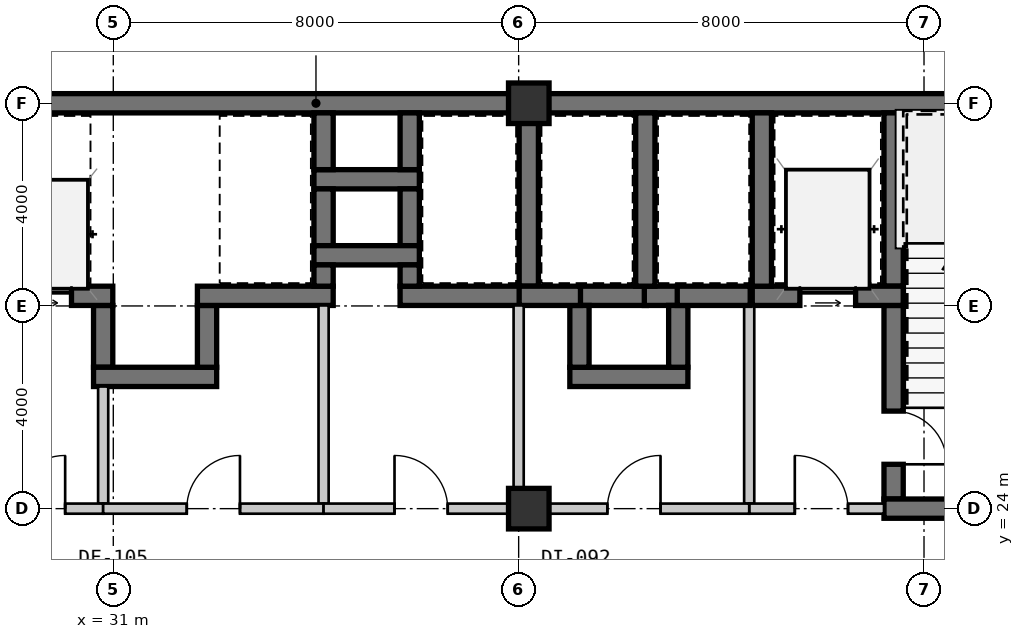
"""IFC4 building model, lengths in metres.
Left out: names, types, materials, properties, quantities, classifications, styles, units other than length and angle.
Written with IfcOpenShell. Run it as: python <this file> out.ifc"""

import sys

from ifc_helpers import new_model, si_unit, direction, frame, frame_2d, origin, origin_2d, place, context, subcontext, project, spatial, rectangle, extrude, source, transform, mapped, element, fill, save


model = new_model("IFC4")
c1 = context("Model", 3, precision=1e-05, world=origin(), true_north=direction((0.0, 1.0)))
c2 = subcontext(c1, "Body", "Model", "MODEL_VIEW")
j1 = project(units=[si_unit("LENGTHUNIT", "METRE"), si_unit("PLANEANGLEUNIT", "RADIAN")], contexts=[c1])
p1 = place(None, origin())
s1 = spatial("IfcSite", under=j1, at=p1, CompositionType="ELEMENT")
p2 = place(p1, origin())
s2 = spatial("IfcBuilding", under=s1, at=p2, CompositionType="ELEMENT")
p3 = place(p2, frame((0.0, 0.0, 57.75)))
s3 = spatial("IfcBuildingStorey", under=s2, at=p3, CompositionType="ELEMENT", Elevation=57.75)
m1 = source(origin(), c2, "Body", "SweptSolid", [
    extrude(rectangle(XDim=0.8, YDim=0.8, at=origin_2d()), origin(), (0.0, 0.0, 1.0), 3.15),
])
for number, where, z_axis, x_axis in (
    (1, (39.2, 24.0, 0.0), (0.0, 0.0, 1.0), (1.0, 0.0, 0.0)),
    (2, (39.2, 32.0, 0.0), (0.0, 0.0, 1.0), (1.0, 0.0, 0.0)),
):
    element("IfcColumn", number, at=place(p3, frame(where, z_axis=z_axis, x_axis=x_axis)), inside=s3, PredefinedType="COLUMN", context=c2, shape_type="MappedRepresentation", body=[
        mapped(m1, transform((0.0, 0.0, 0.0), scale=1.0)),
    ])
m2 = source(origin(), c2, "Body", "SweptSolid", [
    extrude(rectangle(XDim=11.2, YDim=0.38, at=frame_2d((5.6, 0.0))), origin(), (0.0, 0.0, 1.0), 2.87),
])
p4 = place(p3, frame((28.0, 32.0, 0.0), z_axis=(0.0, 0.0, 1.0), x_axis=(1.0, 0.0, 0.0)))
e3 = element("IfcWall", 3, at=p4, inside=s3, PredefinedType="SHEAR", context=c2, shape_type="MappedRepresentation", body=[
    mapped(m2, transform((0.0, 0.0, 0.0), scale=1.0)),
])
m3 = source(origin(), c2, "Body", "SweptSolid", [
    extrude(rectangle(XDim=11.99, YDim=0.38, at=frame_2d((5.995, 0.0))), origin(), (0.0, 0.0, 1.0), 2.87),
])
p5 = place(p3, frame((39.2, 32.0, 0.0), z_axis=(0.0, 0.0, 1.0), x_axis=(1.0, 0.0, 0.0)))
e4 = element("IfcWall", 4, at=p5, inside=s3, PredefinedType="SHEAR", context=c2, shape_type="MappedRepresentation", body=[
    mapped(m3, transform((0.0, 0.0, 0.0), scale=1.0)),
])
m4 = source(origin(), c2, "Body", "SweptSolid", [
    extrude(rectangle(XDim=3.42, YDim=0.38, at=frame_2d((1.71, 0.0))), origin(), (0.0, 0.0, 1.0), 2.87),
])
p6 = place(p3, frame((46.4, 31.81, 0.0), z_axis=(0.0, 0.0, 1.0), x_axis=(0.0, -1.0, 0.0)))
e5 = element("IfcWall", 5, at=p6, inside=s3, PredefinedType="SHEAR", context=c2, shape_type="MappedRepresentation", body=[
    mapped(m4, transform((0.0, 0.0, 0.0), scale=1.0)),
])
m5 = source(origin(), c2, "Body", "SweptSolid", [
    extrude(rectangle(XDim=3.82, YDim=0.38, at=frame_2d((1.91, 0.0))), origin(), (0.0, 0.0, 1.0), 2.87),
])
p7 = place(p3, frame((46.4, 28.01, 0.0), z_axis=(0.0, 0.0, 1.0), x_axis=(0.0, -1.0, 0.0)))
e6 = element("IfcWall", 6, at=p7, inside=s3, PredefinedType="SHEAR", context=c2, shape_type="MappedRepresentation", body=[
    mapped(m5, transform((0.0, 0.0, 0.0), scale=1.0)),
])
m6 = source(origin(), c2, "Body", "SweptSolid", [
    extrude(rectangle(XDim=1.05, YDim=2.1, at=frame_2d((0.525, 1.05))), frame((0.0, 0.2, 0.0), z_axis=(0.0, -1.0, 0.0), x_axis=(1.0, 0.0, 0.0)), (0.0, 0.0, 1.0), 0.4),
])
p8 = place(p7, frame((2.085, 0.0, 0.0)))
e7 = element("IfcOpeningElement", 7, at=p8, cuts=e6, PredefinedType="OPENING", context=c2, shape_type="MappedRepresentation", body=[
    mapped(m6, transform((0.0, 0.0, 0.0), scale=1.0)),
])
m7 = source(origin(), c2, "Body", "SweptSolid", [
    extrude(rectangle(XDim=4.98, YDim=0.38, at=frame_2d((2.49, 0.0))), origin(), (0.0, 0.0, 1.0), 2.87),
])
p9 = place(p3, frame((46.21, 24.0, 0.0), z_axis=(0.0, 0.0, 1.0), x_axis=(1.0, 0.0, 0.0)))
e8 = element("IfcWall", 8, at=p9, inside=s3, PredefinedType="SHEAR", context=c2, shape_type="MappedRepresentation", body=[
    mapped(m7, transform((0.0, 0.0, 0.0), scale=1.0)),
])
m8 = source(origin(), c2, "Body", "SweptSolid", [
    extrude(rectangle(XDim=2.98, YDim=0.38, at=frame_2d((1.49, 0.0))), origin(), (0.0, 0.0, 1.0), 2.87),
])
p10 = place(p3, frame((43.61, 28.2, 0.0), z_axis=(0.0, 0.0, 1.0), x_axis=(1.0, 0.0, 0.0)))
e9 = element("IfcWall", 9, at=p10, inside=s3, PredefinedType="SHEAR", context=c2, shape_type="MappedRepresentation", body=[
    mapped(m8, transform((0.0, 0.0, 0.0), scale=1.0)),
])
m9 = source(origin(), c2, "Body", "SweptSolid", [
    extrude(rectangle(XDim=1.1, YDim=2.15, at=frame_2d((0.55, 1.075))), frame((0.0, 0.2, 0.0), z_axis=(0.0, -1.0, 0.0), x_axis=(1.0, 0.0, 0.0)), (0.0, 0.0, 1.0), 0.4),
])
p11 = place(p10, frame((0.94, 0.0, 0.0)))
e10 = element("IfcOpeningElement", 10, at=p11, cuts=e9, PredefinedType="OPENING", context=c2, shape_type="MappedRepresentation", body=[
    mapped(m9, transform((0.0, 0.0, 0.0), scale=1.0)),
])
p12 = place(p3, frame((43.8, 31.81, 0.0), z_axis=(0.0, 0.0, 1.0), x_axis=(0.0, -1.0, 0.0)))
e11 = element("IfcWall", 11, at=p12, inside=s3, PredefinedType="SHEAR", context=c2, shape_type="MappedRepresentation", body=[
    mapped(m4, transform((0.0, 0.0, 0.0), scale=1.0)),
])
m10 = source(origin(), c2, "Body", "SweptSolid", [
    extrude(rectangle(XDim=3.91, YDim=0.2, at=frame_2d((1.955, 0.0))), origin(), (0.0, 0.0, 1.0), 2.87),
])
p13 = place(p3, frame((43.55, 28.01, 0.0), z_axis=(0.0, 0.0, 1.0), x_axis=(0.0, -1.0, 0.0)))
e12 = element("IfcWall", 12, at=p13, inside=s3, PredefinedType="SOLIDWALL", context=c2, shape_type="MappedRepresentation", body=[
    mapped(m10, transform((0.0, 0.0, 0.0), scale=1.0)),
])
m11 = source(origin(), c2, "Body", "SweptSolid", [
    extrude(rectangle(XDim=2.66, YDim=0.2, at=frame_2d((1.33, 0.0))), origin(), (0.0, 0.0, 1.0), 2.337),
])
p14 = place(p3, frame((43.55, 24.0, 0.0), z_axis=(0.0, 0.0, 1.0), x_axis=(1.0, 0.0, 0.0)))
e13 = element("IfcWall", 13, at=p14, inside=s3, PredefinedType="SOLIDWALL", context=c2, shape_type="MappedRepresentation", body=[
    mapped(m11, transform((0.0, 0.0, 0.0), scale=1.0)),
])
m12 = source(origin(), c2, "Body", "SweptSolid", [
    extrude(rectangle(XDim=1.05, YDim=2.1, at=frame_2d((0.525, 1.05))), frame((0.0, 0.11, 0.0), z_axis=(0.0, -1.0, 0.0), x_axis=(1.0, 0.0, 0.0)), (0.0, 0.0, 1.0), 0.22),
])
p15 = place(p14, frame((0.9, 0.0, 0.0)))
e14 = element("IfcOpeningElement", 14, at=p15, cuts=e13, PredefinedType="OPENING", context=c2, shape_type="MappedRepresentation", body=[
    mapped(m12, transform((0.0, 0.0, 0.0), scale=1.0)),
])
m13 = source(origin(), c2, "Body", "SweptSolid", [
    extrude(rectangle(XDim=2.08, YDim=0.38, at=frame_2d((1.04, 0.0))), origin(), (0.0, 0.0, 1.0), 2.87),
])
p16 = place(p3, frame((34.96, 30.5, 0.0), z_axis=(0.0, 0.0, 1.0), x_axis=(1.0, 0.0, 0.0)))
e15 = element("IfcWall", 15, at=p16, inside=s3, PredefinedType="SHEAR", context=c2, shape_type="MappedRepresentation", body=[
    mapped(m13, transform((0.0, 0.0, 0.0), scale=1.0)),
])
m14 = source(origin(), c2, "Body", "SweptSolid", [
    extrude(rectangle(XDim=1.12, YDim=0.38, at=frame_2d((0.56, 0.0))), origin(), (0.0, 0.0, 1.0), 2.87),
])
for number, where, z_axis, x_axis in (
    (16, (35.15, 31.81, 0.0), (0.0, 0.0, 1.0), (0.0, -1.0, 0.0)),
    (17, (36.85, 30.69, 0.0), (0.0, 0.0, 1.0), (0.0, 1.0, 0.0)),
    (18, (35.15, 30.31, 0.0), (0.0, 0.0, 1.0), (0.0, -1.0, 0.0)),
    (19, (36.85, 29.19, 0.0), (0.0, 0.0, 1.0), (0.0, 1.0, 0.0)),
):
    element("IfcWall", number, at=place(p3, frame(where, z_axis=z_axis, x_axis=x_axis)), inside=s3, PredefinedType="SHEAR", context=c2, shape_type="MappedRepresentation", body=[
        mapped(m14, transform((0.0, 0.0, 0.0), scale=1.0)),
    ])
p17 = place(p3, frame((34.96, 29.0, 0.0), z_axis=(0.0, 0.0, 1.0), x_axis=(1.0, 0.0, 0.0)))
e20 = element("IfcWall", 20, at=p17, inside=s3, PredefinedType="SHEAR", context=c2, shape_type="MappedRepresentation", body=[
    mapped(m13, transform((0.0, 0.0, 0.0), scale=1.0)),
])
m15 = source(origin(), c2, "Body", "SweptSolid", [
    extrude(rectangle(XDim=1.22, YDim=0.38, at=frame_2d((0.61, 0.0))), origin(), (0.0, 0.0, 1.0), 2.87),
])
p18 = place(p3, frame((30.8, 28.01, 0.0), z_axis=(0.0, 0.0, 1.0), x_axis=(0.0, -1.0, 0.0)))
e21 = element("IfcWall", 21, at=p18, inside=s3, PredefinedType="SHEAR", context=c2, shape_type="MappedRepresentation", body=[
    mapped(m15, transform((0.0, 0.0, 0.0), scale=1.0)),
])
m16 = source(origin(), c2, "Body", "SweptSolid", [
    extrude(rectangle(XDim=2.43, YDim=0.38, at=frame_2d((1.215, 0.0))), origin(), (0.0, 0.0, 1.0), 2.87),
])
p19 = place(p3, frame((30.61, 26.6, 0.0), z_axis=(0.0, 0.0, 1.0), x_axis=(1.0, 0.0, 0.0)))
e22 = element("IfcWall", 22, at=p19, inside=s3, PredefinedType="SHEAR", context=c2, shape_type="MappedRepresentation", body=[
    mapped(m16, transform((0.0, 0.0, 0.0), scale=1.0)),
])
p20 = place(p3, frame((32.85, 26.79, 0.0), z_axis=(0.0, 0.0, 1.0), x_axis=(0.0, 1.0, 0.0)))
e23 = element("IfcWall", 23, at=p20, inside=s3, PredefinedType="SHEAR", context=c2, shape_type="MappedRepresentation", body=[
    mapped(m15, transform((0.0, 0.0, 0.0), scale=1.0)),
])
m17 = source(origin(), c2, "Body", "SweptSolid", [
    extrude(rectangle(XDim=1.32, YDim=0.38, at=frame_2d((0.66, 0.0))), origin(), (0.0, 0.0, 1.0), 2.87),
])
p21 = place(p3, frame((41.52, 28.2, 0.0), z_axis=(0.0, 0.0, 1.0), x_axis=(-1.0, 0.0, 0.0)))
e24 = element("IfcWall", 24, at=p21, inside=s3, PredefinedType="SHEAR", context=c2, shape_type="MappedRepresentation", body=[
    mapped(m17, transform((0.0, 0.0, 0.0), scale=1.0)),
])
m18 = source(origin(), c2, "Body", "SweptSolid", [
    extrude(rectangle(XDim=0.67, YDim=0.38, at=frame_2d((0.335, 0.0))), origin(), (0.0, 0.0, 1.0), 2.87),
])
p22 = place(p3, frame((42.15, 28.2, 0.0), z_axis=(0.0, 0.0, 1.0), x_axis=(-1.0, 0.0, 0.0)))
e25 = element("IfcWall", 25, at=p22, inside=s3, PredefinedType="SHEAR", context=c2, shape_type="MappedRepresentation", body=[
    mapped(m18, transform((0.0, 0.0, 0.0), scale=1.0)),
])
m19 = source(origin(), c2, "Body", "SweptSolid", [
    extrude(rectangle(XDim=2.33, YDim=0.38, at=frame_2d((1.165, 0.0))), origin(), (0.0, 0.0, 1.0), 2.87),
])
p23 = place(p3, frame((40.01, 26.6, 0.0), z_axis=(0.0, 0.0, 1.0), x_axis=(1.0, 0.0, 0.0)))
e26 = element("IfcWall", 26, at=p23, inside=s3, PredefinedType="SHEAR", context=c2, shape_type="MappedRepresentation", body=[
    mapped(m19, transform((0.0, 0.0, 0.0), scale=1.0)),
])
for number, where, z_axis, x_axis in (
    (27, (40.2, 28.01, 0.0), (0.0, 0.0, 1.0), (0.0, -1.0, 0.0)),
    (28, (42.15, 26.79, 0.0), (0.0, 0.0, 1.0), (0.0, 1.0, 0.0)),
):
    element("IfcWall", number, at=place(p3, frame(where, z_axis=z_axis, x_axis=x_axis)), inside=s3, PredefinedType="SHEAR", context=c2, shape_type="MappedRepresentation", body=[
        mapped(m15, transform((0.0, 0.0, 0.0), scale=1.0)),
    ])
m20 = source(origin(), c2, "Body", "SweptSolid", [
    extrude(rectangle(XDim=2.49, YDim=0.38, at=frame_2d((1.245, 0.0))), origin(), (0.0, 0.0, 1.0), 2.87),
])
p24 = place(p3, frame((28.5, 28.2, 0.0), z_axis=(0.0, 0.0, 1.0), x_axis=(1.0, 0.0, 0.0)))
e29 = element("IfcWall", 29, at=p24, inside=s3, PredefinedType="SHEAR", context=c2, shape_type="MappedRepresentation", body=[
    mapped(m20, transform((0.0, 0.0, 0.0), scale=1.0)),
])
m21 = source(origin(), c2, "Body", "SweptSolid", [
    extrude(rectangle(XDim=1.05, YDim=2.15, at=frame_2d((0.525, 1.075))), frame((0.0, 0.2, 0.0), z_axis=(0.0, -1.0, 0.0), x_axis=(1.0, 0.0, 0.0)), (0.0, 0.0, 1.0), 0.4),
])
p25 = place(p24, frame((0.625, 0.0, 0.0)))
e30 = element("IfcOpeningElement", 30, at=p25, cuts=e29, PredefinedType="OPENING", context=c2, shape_type="MappedRepresentation", body=[
    mapped(m21, transform((0.0, 0.0, 0.0), scale=1.0)),
])
m22 = source(origin(), c2, "Body", "SweptSolid", [
    extrude(rectangle(XDim=2.31, YDim=0.2, at=frame_2d((1.155, 0.0))), origin(), (0.0, 0.0, 1.0), 2.87),
])
p26 = place(p3, frame((30.8, 26.41, 0.0), z_axis=(0.0, 0.0, 1.0), x_axis=(0.0, -1.0, 0.0)))
e31 = element("IfcWall", 31, at=p26, inside=s3, PredefinedType="SOLIDWALL", context=c2, shape_type="MappedRepresentation", body=[
    mapped(m22, transform((0.0, 0.0, 0.0), scale=1.0)),
])
m23 = source(origin(), c2, "Body", "SweptSolid", [
    extrude(rectangle(XDim=4.35, YDim=0.2, at=frame_2d((2.175, 0.0))), origin(), (0.0, 0.0, 1.0), 2.41),
])
p27 = place(p3, frame((30.8, 24.0, 0.0), z_axis=(0.0, 0.0, 1.0), x_axis=(-1.0, 0.0, 0.0)))
e32 = element("IfcWall", 32, at=p27, inside=s3, PredefinedType="SOLIDWALL", context=c2, shape_type="MappedRepresentation", body=[
    mapped(m23, transform((0.0, 0.0, 0.0), scale=1.0)),
])
p28 = place(p27, frame((0.75, 0.0, 0.0)))
e33 = element("IfcOpeningElement", 33, at=p28, cuts=e32, PredefinedType="OPENING", context=c2, shape_type="MappedRepresentation", body=[
    mapped(m12, transform((0.0, 0.0, 0.0), scale=1.0)),
])
m24 = source(origin(), c2, "Body", "SweptSolid", [
    extrude(rectangle(XDim=2.68, YDim=0.38, at=frame_2d((1.34, 0.0))), origin(), (0.0, 0.0, 1.0), 2.87),
])
p29 = place(p3, frame((32.66, 28.2, 0.0), z_axis=(0.0, 0.0, 1.0), x_axis=(1.0, 0.0, 0.0)))
e34 = element("IfcWall", 34, at=p29, inside=s3, PredefinedType="SHEAR", context=c2, shape_type="MappedRepresentation", body=[
    mapped(m24, transform((0.0, 0.0, 0.0), scale=1.0)),
])
m25 = source(origin(), c2, "Body", "SweptSolid", [
    extrude(rectangle(XDim=0.42, YDim=0.38, at=frame_2d((0.21, 0.0))), origin(), (0.0, 0.0, 1.0), 2.87),
])
p30 = place(p3, frame((35.15, 28.39, 0.0), z_axis=(0.0, 0.0, 1.0), x_axis=(0.0, 1.0, 0.0)))
e35 = element("IfcWall", 35, at=p30, inside=s3, PredefinedType="SHEAR", context=c2, shape_type="MappedRepresentation", body=[
    mapped(m25, transform((0.0, 0.0, 0.0), scale=1.0)),
])
p31 = place(p3, frame((39.2, 28.39, 0.0), z_axis=(0.0, 0.0, 1.0), x_axis=(0.0, 1.0, 0.0)))
e36 = element("IfcWall", 36, at=p31, inside=s3, PredefinedType="SHEAR", context=c2, shape_type="MappedRepresentation", body=[
    mapped(m4, transform((0.0, 0.0, 0.0), scale=1.0)),
])
m26 = source(origin(), c2, "Body", "SweptSolid", [
    extrude(rectangle(XDim=2.36, YDim=0.38, at=frame_2d((1.18, 0.0))), origin(), (0.0, 0.0, 1.0), 2.87),
])
p32 = place(p3, frame((36.66, 28.2, 0.0), z_axis=(0.0, 0.0, 1.0), x_axis=(1.0, 0.0, 0.0)))
e37 = element("IfcWall", 37, at=p32, inside=s3, PredefinedType="SHEAR", context=c2, shape_type="MappedRepresentation", body=[
    mapped(m26, transform((0.0, 0.0, 0.0), scale=1.0)),
])
p33 = place(p3, frame((36.85, 28.81, 0.0), z_axis=(0.0, 0.0, 1.0), x_axis=(0.0, -1.0, 0.0)))
e38 = element("IfcWall", 38, at=p33, inside=s3, PredefinedType="SHEAR", context=c2, shape_type="MappedRepresentation", body=[
    mapped(m25, transform((0.0, 0.0, 0.0), scale=1.0)),
])
p34 = place(p3, frame((41.5, 28.39, 0.0), z_axis=(0.0, 0.0, 1.0), x_axis=(0.0, 1.0, 0.0)))
e39 = element("IfcWall", 39, at=p34, inside=s3, PredefinedType="SHEAR", context=c2, shape_type="MappedRepresentation", body=[
    mapped(m4, transform((0.0, 0.0, 0.0), scale=1.0)),
])
m27 = source(origin(), c2, "Body", "SweptSolid", [
    extrude(rectangle(XDim=1.21, YDim=0.38, at=frame_2d((0.605, 0.0))), origin(), (0.0, 0.0, 1.0), 2.87),
])
p35 = place(p3, frame((39.01, 28.2, 0.0), z_axis=(0.0, 0.0, 1.0), x_axis=(1.0, 0.0, 0.0)))
e40 = element("IfcWall", 40, at=p35, inside=s3, PredefinedType="SHEAR", context=c2, shape_type="MappedRepresentation", body=[
    mapped(m27, transform((0.0, 0.0, 0.0), scale=1.0)),
])
m28 = source(origin(), c2, "Body", "SweptSolid", [
    extrude(rectangle(XDim=1.44, YDim=0.38, at=frame_2d((0.72, 0.0))), origin(), (0.0, 0.0, 1.0), 2.87),
])
p36 = place(p3, frame((42.13, 28.2, 0.0), z_axis=(0.0, 0.0, 1.0), x_axis=(1.0, 0.0, 0.0)))
e41 = element("IfcWall", 41, at=p36, inside=s3, PredefinedType="SHEAR", context=c2, shape_type="MappedRepresentation", body=[
    mapped(m28, transform((0.0, 0.0, 0.0), scale=1.0)),
])
p37 = place(p3, frame((35.15, 28.01, 0.0), z_axis=(0.0, 0.0, 1.0), x_axis=(0.0, -1.0, 0.0)))
e42 = element("IfcWall", 42, at=p37, inside=s3, PredefinedType="SOLIDWALL", context=c2, shape_type="MappedRepresentation", body=[
    mapped(m10, transform((0.0, 0.0, 0.0), scale=1.0)),
])
m29 = source(origin(), c2, "Body", "SweptSolid", [
    extrude(rectangle(XDim=4.35, YDim=0.2, at=frame_2d((2.175, 0.0))), origin(), (0.0, 0.0, 1.0), 2.41),
])
p38 = place(p3, frame((35.15, 24.0, 0.0), z_axis=(0.0, 0.0, 1.0), x_axis=(-1.0, 0.0, 0.0)))
e43 = element("IfcWall", 43, at=p38, inside=s3, PredefinedType="SOLIDWALL", context=c2, shape_type="MappedRepresentation", body=[
    mapped(m29, transform((0.0, 0.0, 0.0), scale=1.0)),
])
p39 = place(p38, frame((1.65, 0.0, 0.0)))
e44 = element("IfcOpeningElement", 44, at=p39, cuts=e43, PredefinedType="OPENING", context=c2, shape_type="MappedRepresentation", body=[
    mapped(m12, transform((0.0, 0.0, 0.0), scale=1.0)),
])
p40 = place(p3, frame((39.0, 28.01, 0.0), z_axis=(0.0, 0.0, 1.0), x_axis=(0.0, -1.0, 0.0)))
e45 = element("IfcWall", 45, at=p40, inside=s3, PredefinedType="SOLIDWALL", context=c2, shape_type="MappedRepresentation", body=[
    mapped(m10, transform((0.0, 0.0, 0.0), scale=1.0)),
])
m30 = source(origin(), c2, "Body", "SweptSolid", [
    extrude(rectangle(XDim=3.85, YDim=0.2, at=frame_2d((1.925, 0.0))), origin(), (0.0, 0.0, 1.0), 2.41),
])
p41 = place(p3, frame((39.0, 24.0, 0.0), z_axis=(0.0, 0.0, 1.0), x_axis=(-1.0, 0.0, 0.0)))
e46 = element("IfcWall", 46, at=p41, inside=s3, PredefinedType="SOLIDWALL", context=c2, shape_type="MappedRepresentation", body=[
    mapped(m30, transform((0.0, 0.0, 0.0), scale=1.0)),
])
p42 = place(p41, frame((1.4, 0.0, 0.0)))
e47 = element("IfcOpeningElement", 47, at=p42, cuts=e46, PredefinedType="OPENING", context=c2, shape_type="MappedRepresentation", body=[
    mapped(m12, transform((0.0, 0.0, 0.0), scale=1.0)),
])
m31 = source(origin(), c2, "Body", "SweptSolid", [
    extrude(rectangle(XDim=4.55, YDim=0.2, at=frame_2d((2.275, 0.0))), origin(), (0.0, 0.0, 1.0), 2.337),
])
p43 = place(p3, frame((43.55, 24.0, 0.0), z_axis=(0.0, 0.0, 1.0), x_axis=(-1.0, 0.0, 0.0)))
e48 = element("IfcWall", 48, at=p43, inside=s3, PredefinedType="SOLIDWALL", context=c2, shape_type="MappedRepresentation", body=[
    mapped(m31, transform((0.0, 0.0, 0.0), scale=1.0)),
])
p44 = place(p43, frame((1.75, 0.0, 0.0)))
e49 = element("IfcOpeningElement", 49, at=p44, cuts=e48, PredefinedType="OPENING", context=c2, shape_type="MappedRepresentation", body=[
    mapped(m12, transform((0.0, 0.0, 0.0), scale=1.0)),
])
m32 = source(origin(), c2, "Body", "SweptSolid", [
    extrude(rectangle(XDim=1.05, YDim=2.1, at=frame_2d((0.525, 1.05))), frame((0.0, 0.025, 0.0), z_axis=(0.0, -1.0, 0.0), x_axis=(1.0, 0.0, 0.0)), (0.0, 0.0, 1.0), 0.05),
])
p45 = place(p8, origin())
e50 = element("IfcDoor", 50, at=p45, inside=s3, OperationType="SINGLE_SWING_RIGHT", PredefinedType="DOOR", context=c2, shape_type="MappedRepresentation", body=[
    mapped(m32, transform((0.0, 0.0, 0.0), scale=1.0)),
])
fill(e7, e50)
m33 = source(origin(), c2, "Body", "SweptSolid", [
    extrude(rectangle(XDim=1.1, YDim=2.15, at=frame_2d((0.55, 1.075))), frame((0.0, 0.025, 0.0), z_axis=(0.0, -1.0, 0.0), x_axis=(1.0, 0.0, 0.0)), (0.0, 0.0, 1.0), 0.05),
])
p46 = place(p11, origin())
e51 = element("IfcDoor", 51, at=p46, inside=s3, OperationType="SLIDING_TO_LEFT", PredefinedType="DOOR", context=c2, shape_type="MappedRepresentation", body=[
    mapped(m33, transform((0.0, 0.0, 0.0), scale=1.0)),
])
fill(e10, e51)
p47 = place(p15, origin())
e52 = element("IfcDoor", 52, at=p47, inside=s3, OperationType="SINGLE_SWING_LEFT", PredefinedType="DOOR", context=c2, shape_type="MappedRepresentation", body=[
    mapped(m32, transform((0.0, 0.0, 0.0), scale=1.0)),
])
fill(e14, e52)
m34 = source(origin(), c2, "Body", "SweptSolid", [
    extrude(rectangle(XDim=1.05, YDim=2.15, at=frame_2d((0.525, 1.075))), frame((0.0, 0.025, 0.0), z_axis=(0.0, -1.0, 0.0), x_axis=(1.0, 0.0, 0.0)), (0.0, 0.0, 1.0), 0.05),
])
p48 = place(p25, origin())
e53 = element("IfcDoor", 53, at=p48, inside=s3, OperationType="SLIDING_TO_LEFT", PredefinedType="DOOR", context=c2, shape_type="MappedRepresentation", body=[
    mapped(m34, transform((0.0, 0.0, 0.0), scale=1.0)),
])
fill(e30, e53)
p49 = place(p28, frame((1.05, 0.0, 0.0), z_axis=(0.0, 0.0, 1.0), x_axis=(-1.0, 0.0, 0.0)))
e54 = element("IfcDoor", 54, at=p49, inside=s3, OperationType="SINGLE_SWING_RIGHT", PredefinedType="DOOR", context=c2, shape_type="MappedRepresentation", body=[
    mapped(m32, transform((0.0, 0.0, 0.0), scale=1.0)),
])
fill(e33, e54)
p50 = place(p39, frame((1.05, 0.0, 0.0), z_axis=(0.0, 0.0, 1.0), x_axis=(-1.0, 0.0, 0.0)))
e55 = element("IfcDoor", 55, at=p50, inside=s3, OperationType="SINGLE_SWING_RIGHT", PredefinedType="DOOR", context=c2, shape_type="MappedRepresentation", body=[
    mapped(m32, transform((0.0, 0.0, 0.0), scale=1.0)),
])
fill(e44, e55)
p51 = place(p42, frame((1.05, 0.0, 0.0), z_axis=(0.0, 0.0, 1.0), x_axis=(-1.0, 0.0, 0.0)))
e56 = element("IfcDoor", 56, at=p51, inside=s3, OperationType="SINGLE_SWING_LEFT", PredefinedType="DOOR", context=c2, shape_type="MappedRepresentation", body=[
    mapped(m32, transform((0.0, 0.0, 0.0), scale=1.0)),
])
fill(e47, e56)
p52 = place(p44, frame((1.05, 0.0, 0.0), z_axis=(0.0, 0.0, 1.0), x_axis=(-1.0, 0.0, 0.0)))
e57 = element("IfcDoor", 57, at=p52, inside=s3, OperationType="SINGLE_SWING_RIGHT", PredefinedType="DOOR", context=c2, shape_type="MappedRepresentation", body=[
    mapped(m32, transform((0.0, 0.0, 0.0), scale=1.0)),
])
fill(e49, e57)
save(model, sys.argv[1])
